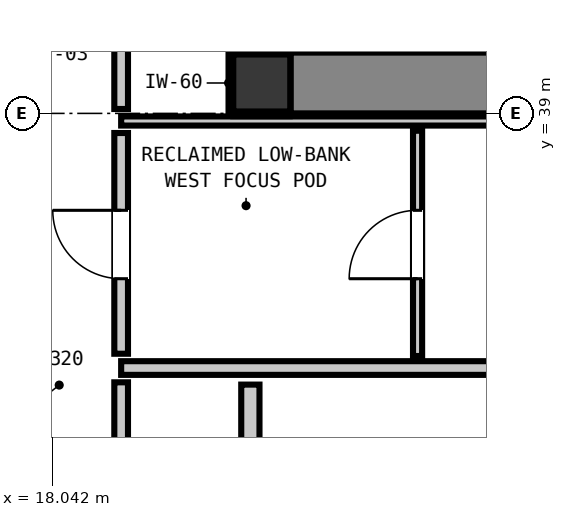
"""IFC4 building model, lengths in metres.
Left out: names, types, materials, properties, quantities, classifications, styles, units other than length and angle.
Written with IfcOpenShell. Run it as: python <this file> out.ifc"""

import sys

from ifc_helpers import new_model, si_unit, direction, frame, frame_2d, origin, origin_2d, place, context, subcontext, project, spatial, rectangle, extrude, element, fill, save


model = new_model("IFC4")
c1 = context("Model", 3, precision=1e-05, world=origin(), true_north=direction((0.0, 1.0)))
c2 = subcontext(c1, "Body", "Model", "MODEL_VIEW")
j1 = project(units=[si_unit("LENGTHUNIT", "METRE"), si_unit("PLANEANGLEUNIT", "RADIAN")], contexts=[c1])
p1 = place(None, origin())
s1 = spatial("IfcSite", under=j1, at=p1, CompositionType="ELEMENT")
p2 = place(p1, origin())
s2 = spatial("IfcBuilding", under=s1, at=p2, CompositionType="ELEMENT")
p3 = place(p2, frame((0.0, 0.0, 186.84)))
s3 = spatial("IfcBuildingStorey", under=s2, at=p3, CompositionType="ELEMENT", Elevation=186.84)
p4 = place(p3, frame((20.8, 39.4, 0.0), z_axis=(0.0, 0.0, 1.0), x_axis=(1.0, 0.0, 0.0)))
e1 = element("IfcColumn", 1, at=p4, inside=s3, PredefinedType="COLUMN", context=c2, shape_type="SweptSolid", body=[
    extrude(rectangle(XDim=0.75, YDim=0.75, at=origin_2d()), origin(), (0.0, 0.0, 1.0), 3.32),
])
p5 = place(p3, frame((21.18, 39.4, 0.0), z_axis=(0.0, 0.0, 1.0), x_axis=(1.0, 0.0, 0.0)))
e2 = element("IfcWall", 2, at=p5, inside=s3, PredefinedType="SHEAR", context=c2, shape_type="SweptSolid", body=[
    extrude(rectangle(XDim=7.64, YDim=0.8, at=frame_2d((3.82, 0.0))), origin(), (0.0, 0.0, 1.0), 3.32),
])
p6 = place(p3, frame((18.95, 35.65, 0.0), z_axis=(0.0, 0.0, 1.0), x_axis=(1.0, 0.0, 0.0)))
e3 = element("IfcWall", 3, at=p6, inside=s3, PredefinedType="PARTITIONING", context=c2, shape_type="SweptSolid", body=[
    extrude(rectangle(XDim=11.025, YDim=0.18, at=frame_2d((5.513, 0.0))), origin(), (0.0, 0.0, 1.0), 2.9),
])
p7 = place(p3, frame((18.95, 38.9, 0.0), z_axis=(0.0, 0.0, 1.0), x_axis=(1.0, 0.0, 0.0)))
e4 = element("IfcWall", 4, at=p7, inside=s3, PredefinedType="PARTITIONING", context=c2, shape_type="SweptSolid", body=[
    extrude(rectangle(XDim=11.025, YDim=0.12, at=frame_2d((5.513, 0.0))), origin(), (0.0, 0.0, 1.0), 0.905),
])
p8 = place(p3, frame((20.65, 33.148, 0.0), z_axis=(0.0, 0.0, 1.0), x_axis=(0.0, 1.0, 0.0)))
e5 = element("IfcWall", 5, at=p8, inside=s3, PredefinedType="PARTITIONING", context=c2, shape_type="SweptSolid", body=[
    extrude(rectangle(XDim=2.284, YDim=0.24, at=frame_2d((1.142, 0.0))), origin(), (0.0, 0.0, 1.0), 0.905),
])
p9 = place(p3, frame((18.95, 33.118, 0.0), z_axis=(0.0, 0.0, 1.0), x_axis=(0.0, 1.0, 0.0)))
e6 = element("IfcWall", 6, at=p9, inside=s3, PredefinedType="PARTITIONING", context=c2, shape_type="SweptSolid", body=[
    extrude(rectangle(XDim=2.344, YDim=0.18, at=frame_2d((1.172, 0.0))), origin(), (0.0, 0.0, 1.0), 2.9),
])
p10 = place(p3, frame((18.95, 35.838, 0.0), z_axis=(0.0, 0.0, 1.0), x_axis=(0.0, 1.0, 0.0)))
e7 = element("IfcWall", 7, at=p10, inside=s3, PredefinedType="PARTITIONING", context=c2, shape_type="SweptSolid", body=[
    extrude(rectangle(XDim=2.904, YDim=0.18, at=frame_2d((1.452, 0.0))), origin(), (0.0, 0.0, 1.0), 2.9),
])
p11 = place(p10, frame((0.987, 0.0, 0.0)))
e8 = element("IfcOpeningElement", 8, at=p11, cuts=e7, PredefinedType="OPENING", context=c2, shape_type="SweptSolid", body=[
    extrude(rectangle(XDim=0.9, YDim=2.1, at=frame_2d((0.45, 1.05))), frame((0.0, 0.1, 0.0), z_axis=(0.0, -1.0, 0.0), x_axis=(1.0, 0.0, 0.0)), (0.0, 0.0, 1.0), 0.2),
])
p12 = place(p3, frame((18.95, 39.058, 0.0), z_axis=(0.0, 0.0, 1.0), x_axis=(0.0, 1.0, 0.0)))
e9 = element("IfcWall", 9, at=p12, inside=s3, PredefinedType="PARTITIONING", context=c2, shape_type="SweptSolid", body=[
    extrude(rectangle(XDim=1.004, YDim=0.18, at=frame_2d((0.502, 0.0))), origin(), (0.0, 0.0, 1.0), 2.9),
])
p13 = place(p3, frame((22.85, 35.808, 0.0), z_axis=(0.0, 0.0, 1.0), x_axis=(0.0, 1.0, 0.0)))
e10 = element("IfcWall", 10, at=p13, inside=s3, PredefinedType="PARTITIONING", context=c2, shape_type="SweptSolid", body=[
    extrude(rectangle(XDim=2.964, YDim=0.12, at=frame_2d((1.482, 0.0))), origin(), (0.0, 0.0, 1.0), 2.9),
])
p14 = place(p13, frame((1.017, 0.0, 0.0)))
e11 = element("IfcOpeningElement", 11, at=p14, cuts=e10, PredefinedType="OPENING", context=c2, shape_type="SweptSolid", body=[
    extrude(rectangle(XDim=0.9, YDim=2.1, at=frame_2d((0.45, 1.05))), frame((0.0, 0.07, 0.0), z_axis=(0.0, -1.0, 0.0), x_axis=(1.0, 0.0, 0.0)), (0.0, 0.0, 1.0), 0.14),
])
for number, where, z_axis, x_axis in (
    (12, (20.425, 38.993, 0.0), (0.0, 0.0, 1.0), (1.0, 0.0, 0.0)),
    (13, (20.425, 39.807, 0.0), (0.0, 0.0, 1.0), (1.0, 0.0, 0.0)),
):
    element("IfcWall", number, at=place(p3, frame(where, z_axis=z_axis, x_axis=x_axis)), inside=s3, PredefinedType="PARTITIONING", context=c2, shape_type="SweptSolid", body=[
        extrude(rectangle(XDim=0.742, YDim=0.06, at=frame_2d((0.371, 0.0))), origin(), (0.0, 0.0, 1.0), 0.905),
    ])
p15 = place(p3, frame((20.393, 39.025, 0.0), z_axis=(0.0, 0.0, 1.0), x_axis=(0.0, 1.0, 0.0)))
e14 = element("IfcWall", 14, at=p15, inside=s3, PredefinedType="PARTITIONING", context=c2, shape_type="SweptSolid", body=[
    extrude(rectangle(XDim=0.75, YDim=0.06, at=frame_2d((0.375, 0.0))), origin(), (0.0, 0.0, 1.0), 0.905),
])
p16 = place(p11, origin())
e15 = element("IfcDoor", 15, at=p16, inside=s3, OperationType="SINGLE_SWING_RIGHT", PredefinedType="DOOR", context=c2, shape_type="SweptSolid", body=[
    extrude(rectangle(XDim=0.9, YDim=2.1, at=frame_2d((0.45, 1.05))), frame((0.0, 0.025, 0.0), z_axis=(0.0, -1.0, 0.0), x_axis=(1.0, 0.0, 0.0)), (0.0, 0.0, 1.0), 0.05),
])
fill(e8, e15)
p17 = place(p14, origin())
e16 = element("IfcDoor", 16, at=p17, inside=s3, OperationType="SINGLE_SWING_LEFT", PredefinedType="DOOR", context=c2, shape_type="SweptSolid", body=[
    extrude(rectangle(XDim=0.9, YDim=2.1, at=frame_2d((0.45, 1.05))), frame((0.0, 0.025, 0.0), z_axis=(0.0, -1.0, 0.0), x_axis=(1.0, 0.0, 0.0)), (0.0, 0.0, 1.0), 0.05),
])
fill(e11, e16)
save(model, sys.argv[1])
